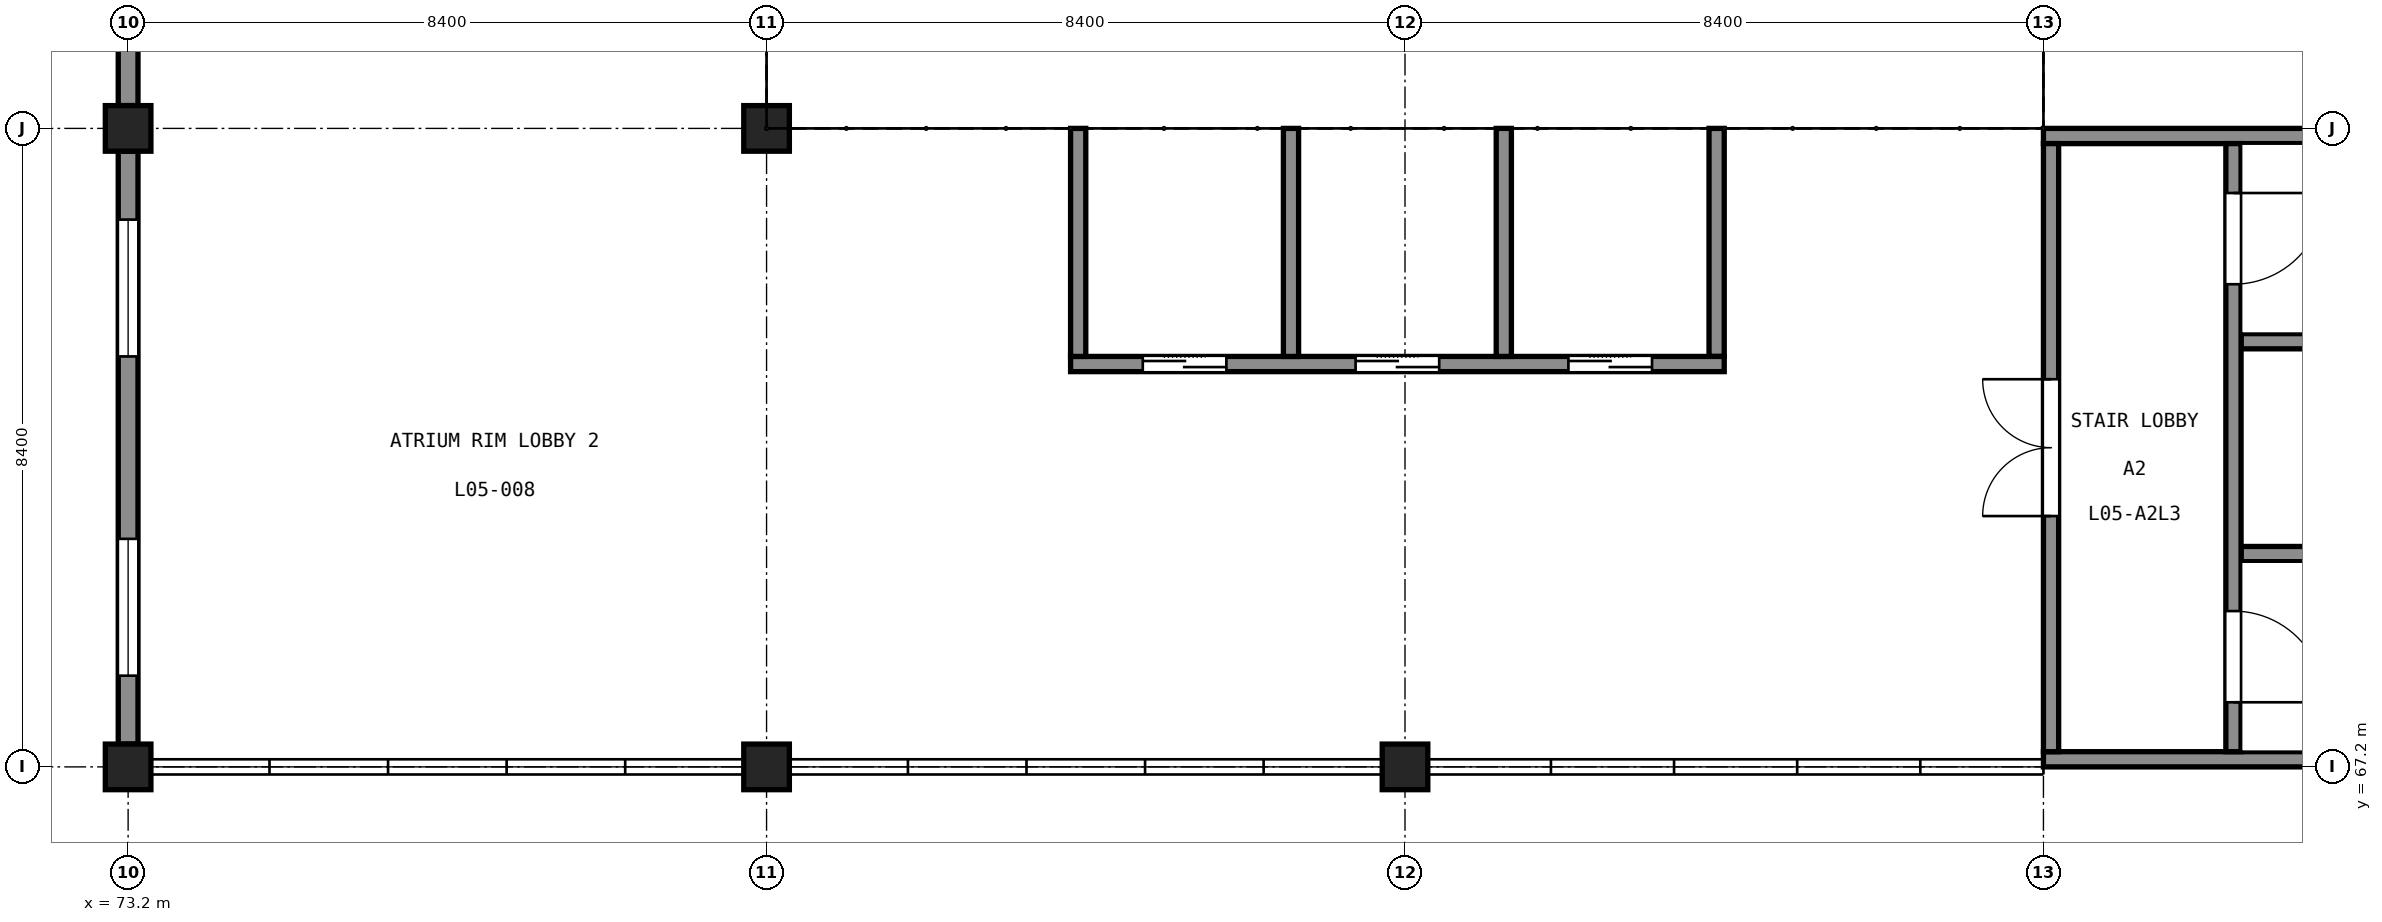
"""IFC4 building model, lengths in metres.
Left out: names, types, materials, properties, quantities, classifications, styles, units other than length and angle.
Written with IfcOpenShell. Run it as: python <this file> out.ifc"""

import sys

from ifc_helpers import new_model, si_unit, direction, frame, frame_2d, origin, origin_2d, place, context, subcontext, project, spatial, polyline, rectangle, outline, extrude, element, fill, save


model = new_model("IFC4")
c1 = context("Model", 3, precision=1e-05, world=origin(), true_north=direction((0.0, 1.0)))
c2 = subcontext(c1, "Body", "Model", "MODEL_VIEW")
j1 = project(units=[si_unit("LENGTHUNIT", "METRE"), si_unit("PLANEANGLEUNIT", "RADIAN")], contexts=[c1])
p1 = place(None, origin())
s1 = spatial("IfcSite", under=j1, at=p1, CompositionType="ELEMENT")
p2 = place(p1, origin())
s2 = spatial("IfcBuilding", under=s1, at=p2, CompositionType="ELEMENT")
p3 = place(p2, frame((0.0, 0.0, 30.0)))
s3 = spatial("IfcBuildingStorey", under=s2, at=p3, CompositionType="ELEMENT", Elevation=30.0)
for number, where, z_axis, x_axis in (
    (1, (98.4, 67.3, 0.0), (0.0, 0.0, 1.0), (1.0, 0.0, 0.0)),
    (2, (98.4, 75.5, 0.0), (0.0, 0.0, 1.0), (1.0, 0.0, 0.0)),
):
    element("IfcWall", number, at=place(p3, frame(where, z_axis=z_axis, x_axis=x_axis)), inside=s3, PredefinedType="SHEAR", context=c2, shape_type="SweptSolid", body=[
        extrude(rectangle(XDim=8.4, YDim=0.2, at=frame_2d((4.2, 0.0))), origin(), (0.0, 0.0, 1.0), 9.067),
    ])
p4 = place(p3, frame((98.5, 67.4, 0.0), z_axis=(0.0, 0.0, 1.0), x_axis=(0.0, 1.0, 0.0)))
e3 = element("IfcWall", 3, at=p4, inside=s3, PredefinedType="SHEAR", context=c2, shape_type="SweptSolid", body=[
    extrude(rectangle(XDim=8.0, YDim=0.2, at=frame_2d((4.0, 0.0))), origin(), (0.0, 0.0, 1.0), 9.067),
])
p5 = place(p4, frame((3.1, 0.0, 0.0)))
e4 = element("IfcOpeningElement", 4, at=p5, cuts=e3, PredefinedType="OPENING", context=c2, shape_type="SweptSolid", body=[
    extrude(rectangle(XDim=1.8, YDim=2.1, at=frame_2d((0.9, 1.05))), frame((0.0, 0.11, 0.0), z_axis=(0.0, -1.0, 0.0), x_axis=(1.0, 0.0, 0.0)), (0.0, 0.0, 1.0), 0.22),
])
p6 = place(p3, frame((100.9, 67.4, 0.0), z_axis=(0.0, 0.0, 1.0), x_axis=(0.0, 1.0, 0.0)))
e5 = element("IfcWall", 5, at=p6, inside=s3, PredefinedType="SHEAR", context=c2, shape_type="SweptSolid", body=[
    extrude(rectangle(XDim=8.0, YDim=0.2, at=frame_2d((4.0, 0.0))), origin(), (0.0, 0.0, 1.0), 9.067),
])
p7 = place(p6, frame((0.65, 0.0, 0.0)))
e6 = element("IfcOpeningElement", 6, at=p7, cuts=e5, PredefinedType="OPENING", context=c2, shape_type="SweptSolid", body=[
    extrude(rectangle(XDim=1.2, YDim=2.1, at=frame_2d((0.6, 1.05))), frame((0.0, 0.11, 0.0), z_axis=(0.0, -1.0, 0.0), x_axis=(1.0, 0.0, 0.0)), (0.0, 0.0, 1.0), 0.22),
])
p8 = place(p6, frame((6.15, 0.0, 0.0)))
e7 = element("IfcOpeningElement", 7, at=p8, cuts=e5, PredefinedType="OPENING", context=c2, shape_type="SweptSolid", body=[
    extrude(rectangle(XDim=1.2, YDim=2.1, at=frame_2d((0.6, 1.05))), frame((0.0, 0.11, 0.0), z_axis=(0.0, -1.0, 0.0), x_axis=(1.0, 0.0, 0.0)), (0.0, 0.0, 1.0), 0.22),
])
for number, where, z_axis, x_axis in (
    (8, (101.0, 70.0, 0.0), (0.0, 0.0, 1.0), (1.0, 0.0, 0.0)),
    (9, (101.0, 72.8, 0.0), (0.0, 0.0, 1.0), (1.0, 0.0, 0.0)),
):
    element("IfcWall", number, at=place(p3, frame(where, z_axis=z_axis, x_axis=x_axis)), inside=s3, PredefinedType="SHEAR", context=c2, shape_type="SweptSolid", body=[
        extrude(rectangle(XDim=5.6, YDim=0.2, at=frame_2d((2.8, 0.0))), origin(), (0.0, 0.0, 1.0), 9.067),
    ])
p9 = place(p3, frame((85.6, 72.5, 0.0), z_axis=(0.0, 0.0, 1.0), x_axis=(1.0, 0.0, 0.0)))
e10 = element("IfcWall", 10, at=p9, inside=s3, PredefinedType="SHEAR", context=c2, shape_type="SweptSolid", body=[
    extrude(rectangle(XDim=8.6, YDim=0.2, at=frame_2d((4.3, 0.0))), origin(), (0.0, 0.0, 1.0), 5.0),
])
p10 = place(p9, frame((0.95, 0.0, 0.0)))
e11 = element("IfcOpeningElement", 11, at=p10, cuts=e10, PredefinedType="OPENING", context=c2, shape_type="SweptSolid", body=[
    extrude(rectangle(XDim=1.1, YDim=2.1, at=frame_2d((0.55, 1.05))), frame((0.0, 0.11, 0.0), z_axis=(0.0, -1.0, 0.0), x_axis=(1.0, 0.0, 0.0)), (0.0, 0.0, 1.0), 0.22),
])
p11 = place(p9, frame((3.75, 0.0, 0.0)))
e12 = element("IfcOpeningElement", 12, at=p11, cuts=e10, PredefinedType="OPENING", context=c2, shape_type="SweptSolid", body=[
    extrude(rectangle(XDim=1.1, YDim=2.1, at=frame_2d((0.55, 1.05))), frame((0.0, 0.11, 0.0), z_axis=(0.0, -1.0, 0.0), x_axis=(1.0, 0.0, 0.0)), (0.0, 0.0, 1.0), 0.22),
])
p12 = place(p9, frame((6.55, 0.0, 0.0)))
e13 = element("IfcOpeningElement", 13, at=p12, cuts=e10, PredefinedType="OPENING", context=c2, shape_type="SweptSolid", body=[
    extrude(rectangle(XDim=1.1, YDim=2.1, at=frame_2d((0.55, 1.05))), frame((0.0, 0.11, 0.0), z_axis=(0.0, -1.0, 0.0), x_axis=(1.0, 0.0, 0.0)), (0.0, 0.0, 1.0), 0.22),
])
for number, where, z_axis, x_axis in (
    (14, (85.7, 72.6, 0.0), (0.0, 0.0, 1.0), (0.0, 1.0, 0.0)),
    (15, (94.1, 72.6, 0.0), (0.0, 0.0, 1.0), (0.0, 1.0, 0.0)),
    (16, (88.5, 72.6, 0.0), (0.0, 0.0, 1.0), (0.0, 1.0, 0.0)),
    (17, (91.3, 72.6, 0.0), (0.0, 0.0, 1.0), (0.0, 1.0, 0.0)),
):
    element("IfcWall", number, at=place(p3, frame(where, z_axis=z_axis, x_axis=x_axis)), inside=s3, PredefinedType="SHEAR", context=c2, shape_type="SweptSolid", body=[
        extrude(rectangle(XDim=3.0, YDim=0.2, at=frame_2d((1.5, 0.0))), origin(), (0.0, 0.0, 1.0), 5.0),
    ])
p13 = place(p3, frame((73.2, 67.2, 0.0), z_axis=(0.0, 0.0, 1.0), x_axis=(1.0, 0.0, 0.0)))
e18 = element("IfcColumn", 18, at=p13, inside=s3, PredefinedType="COLUMN", context=c2, shape_type="SweptSolid", body=[
    extrude(rectangle(XDim=0.6, YDim=0.6, at=origin_2d()), origin(), (0.0, 0.0, 1.0), 3.67),
])
p14 = place(p3, frame((73.2, 75.6, 0.0), z_axis=(0.0, 0.0, 1.0), x_axis=(1.0, 0.0, 0.0)))
e19 = element("IfcColumn", 19, at=p14, inside=s3, PredefinedType="COLUMN", context=c2, shape_type="SweptSolid", body=[
    extrude(rectangle(XDim=0.6, YDim=0.6, at=origin_2d()), origin(), (0.0, 0.0, 1.0), 3.653),
])
p15 = place(p3, frame((81.6, 67.2, 0.0), z_axis=(0.0, 0.0, 1.0), x_axis=(1.0, 0.0, 0.0)))
e20 = element("IfcColumn", 20, at=p15, inside=s3, PredefinedType="COLUMN", context=c2, shape_type="SweptSolid", body=[
    extrude(rectangle(XDim=0.6, YDim=0.6, at=origin_2d()), origin(), (0.0, 0.0, 1.0), 3.67),
])
p16 = place(p3, frame((81.6, 75.6, 0.0), z_axis=(0.0, 0.0, 1.0), x_axis=(1.0, 0.0, 0.0)))
e21 = element("IfcColumn", 21, at=p16, inside=s3, PredefinedType="COLUMN", context=c2, shape_type="SweptSolid", body=[
    extrude(rectangle(XDim=0.6, YDim=0.6, at=origin_2d()), origin(), (0.0, 0.0, 1.0), 3.653),
])
p17 = place(p3, frame((90.0, 67.2, 0.0), z_axis=(0.0, 0.0, 1.0), x_axis=(1.0, 0.0, 0.0)))
e22 = element("IfcColumn", 22, at=p17, inside=s3, PredefinedType="COLUMN", context=c2, shape_type="SweptSolid", body=[
    extrude(rectangle(XDim=0.6, YDim=0.6, at=origin_2d()), origin(), (0.0, 0.0, 1.0), 3.67),
])
p18 = place(p3, frame((73.2, 75.9, 0.0), z_axis=(0.0, 0.0, 1.0), x_axis=(0.0, 1.0, 0.0)))
e23 = element("IfcWall", 23, at=p18, inside=s3, PredefinedType="SOLIDWALL", context=c2, shape_type="SweptSolid", body=[
    extrude(outline(polyline([(0.0, 0.0), (8.1, 0.0), (8.1, 3.643), (5.301, 3.137), (5.299, 3.643), (0.0, 3.643), (0.0, 0.0)])), frame((0.0, 0.13, 0.0), z_axis=(0.0, -1.0, 0.0), x_axis=(1.0, 0.0, 0.0)), (0.0, 0.0, 1.0), 0.26),
])
p19 = place(p3, frame((73.2, 67.5, 0.0), z_axis=(0.0, 0.0, 1.0), x_axis=(0.0, 1.0, 0.0)))
e24 = element("IfcWall", 24, at=p19, inside=s3, PredefinedType="SOLIDWALL", context=c2, shape_type="SweptSolid", body=[
    extrude(outline(polyline([(0.0, 0.0), (7.8, 0.0), (7.8, 6.64), (0.0, 4.332), (0.0, 0.0)])), frame((0.0, 0.13, 0.0), z_axis=(0.0, -1.0, 0.0), x_axis=(1.0, 0.0, 0.0)), (0.0, 0.0, 1.0), 0.26),
])
p20 = place(p19, frame((0.9, 0.0, 0.9)))
e25 = element("IfcOpeningElement", 25, at=p20, cuts=e24, PredefinedType="OPENING", context=c2, shape_type="SweptSolid", body=[
    extrude(rectangle(XDim=1.8, YDim=2.7, at=frame_2d((0.9, 1.35))), frame((0.0, 0.14, 0.0), z_axis=(0.0, -1.0, 0.0), x_axis=(1.0, 0.0, 0.0)), (0.0, 0.0, 1.0), 0.28),
])
p21 = place(p19, frame((5.1, 0.0, 0.9)))
e26 = element("IfcOpeningElement", 26, at=p21, cuts=e24, PredefinedType="OPENING", context=c2, shape_type="SweptSolid", body=[
    extrude(rectangle(XDim=1.8, YDim=2.7, at=frame_2d((0.9, 1.35))), frame((0.0, 0.14, 0.0), z_axis=(0.0, -1.0, 0.0), x_axis=(1.0, 0.0, 0.0)), (0.0, 0.0, 1.0), 0.28),
])
p22 = place(p20, origin())
e27 = element("IfcWindow", 27, at=p22, inside=s3, PartitioningType="SINGLE_PANEL", PredefinedType="WINDOW", context=c2, shape_type="SweptSolid", body=[
    extrude(rectangle(XDim=1.8, YDim=2.7, at=frame_2d((0.9, 1.35))), frame((0.0, -0.05, 0.0), z_axis=(0.0, -1.0, 0.0), x_axis=(1.0, 0.0, 0.0)), (0.0, 0.0, 1.0), 0.06),
])
fill(e25, e27)
p23 = place(p21, origin())
e28 = element("IfcWindow", 28, at=p23, inside=s3, PartitioningType="SINGLE_PANEL", PredefinedType="WINDOW", context=c2, shape_type="SweptSolid", body=[
    extrude(rectangle(XDim=1.8, YDim=2.7, at=frame_2d((0.9, 1.35))), frame((0.0, -0.05, 0.0), z_axis=(0.0, -1.0, 0.0), x_axis=(1.0, 0.0, 0.0)), (0.0, 0.0, 1.0), 0.06),
])
fill(e26, e28)
p24 = place(p3, frame((73.2, 67.2, 5.0), z_axis=(5.49644e-07, -0.292373342907, 0.956304255118), x_axis=(-1e-12, 0.956304255118, 0.292373342907)))
p25 = place(p24, frame((7.32, -5.8, 0.01), z_axis=(0.0, 0.0, -1.0), x_axis=(1.797794e-06, -0.999999999998, 0.0)))
p26 = place(p25, frame((0.0, 0.0, 0.01)))
e29 = element("IfcWindow", 29, at=p26, inside=s3, PartitioningType="SINGLE_PANEL", PredefinedType="SKYLIGHT", context=c2, shape_type="SweptSolid", body=[
    extrude(rectangle(XDim=1.0, YDim=1.4, at=origin_2d()), origin(), (0.0, 0.0, 1.0), 0.05),
])
p27 = place(p24, frame((7.32, -16.8, 0.01), z_axis=(0.0, 0.0, -1.0), x_axis=(1.797794e-06, -0.999999999998, 0.0)))
p28 = place(p27, frame((0.0, 0.0, 0.01)))
e30 = element("IfcWindow", 30, at=p28, inside=s3, PartitioningType="SINGLE_PANEL", PredefinedType="SKYLIGHT", context=c2, shape_type="SweptSolid", body=[
    extrude(rectangle(XDim=1.0, YDim=1.4, at=origin_2d()), origin(), (0.0, 0.0, 1.0), 0.05),
])
p29 = place(p5, origin())
e31 = element("IfcDoor", 31, at=p29, inside=s3, OperationType="DOUBLE_DOOR_SINGLE_SWING", PredefinedType="DOOR", context=c2, shape_type="SweptSolid", body=[
    extrude(rectangle(XDim=1.8, YDim=2.1, at=frame_2d((0.9, 1.05))), frame((0.0, 0.025, 0.0), z_axis=(0.0, -1.0, 0.0), x_axis=(1.0, 0.0, 0.0)), (0.0, 0.0, 1.0), 0.05),
])
fill(e4, e31)
p30 = place(p7, origin())
e32 = element("IfcDoor", 32, at=p30, inside=s3, OperationType="SINGLE_SWING_LEFT", PredefinedType="DOOR", context=c2, shape_type="SweptSolid", body=[
    extrude(rectangle(XDim=1.2, YDim=2.1, at=frame_2d((0.6, 1.05))), frame((0.0, 0.025, 0.0), z_axis=(0.0, -1.0, 0.0), x_axis=(1.0, 0.0, 0.0)), (0.0, 0.0, 1.0), 0.05),
])
fill(e6, e32)
p31 = place(p8, origin())
e33 = element("IfcDoor", 33, at=p31, inside=s3, OperationType="SINGLE_SWING_RIGHT", PredefinedType="DOOR", context=c2, shape_type="SweptSolid", body=[
    extrude(rectangle(XDim=1.2, YDim=2.1, at=frame_2d((0.6, 1.05))), frame((0.0, 0.025, 0.0), z_axis=(0.0, -1.0, 0.0), x_axis=(1.0, 0.0, 0.0)), (0.0, 0.0, 1.0), 0.05),
])
fill(e7, e33)
p32 = place(p10, origin())
e34 = element("IfcDoor", 34, at=p32, inside=s3, OperationType="DOUBLE_DOOR_SLIDING", PredefinedType="DOOR", context=c2, shape_type="SweptSolid", body=[
    extrude(rectangle(XDim=1.1, YDim=2.1, at=frame_2d((0.55, 1.05))), frame((0.0, 0.025, 0.0), z_axis=(0.0, -1.0, 0.0), x_axis=(1.0, 0.0, 0.0)), (0.0, 0.0, 1.0), 0.05),
])
fill(e11, e34)
p33 = place(p11, origin())
e35 = element("IfcDoor", 35, at=p33, inside=s3, OperationType="DOUBLE_DOOR_SLIDING", PredefinedType="DOOR", context=c2, shape_type="SweptSolid", body=[
    extrude(rectangle(XDim=1.1, YDim=2.1, at=frame_2d((0.55, 1.05))), frame((0.0, 0.025, 0.0), z_axis=(0.0, -1.0, 0.0), x_axis=(1.0, 0.0, 0.0)), (0.0, 0.0, 1.0), 0.05),
])
fill(e12, e35)
p34 = place(p12, origin())
e36 = element("IfcDoor", 36, at=p34, inside=s3, OperationType="DOUBLE_DOOR_SLIDING", PredefinedType="DOOR", context=c2, shape_type="SweptSolid", body=[
    extrude(rectangle(XDim=1.1, YDim=2.1, at=frame_2d((0.55, 1.05))), frame((0.0, 0.025, 0.0), z_axis=(0.0, -1.0, 0.0), x_axis=(1.0, 0.0, 0.0)), (0.0, 0.0, 1.0), 0.05),
])
fill(e13, e36)
save(model, sys.argv[1])
